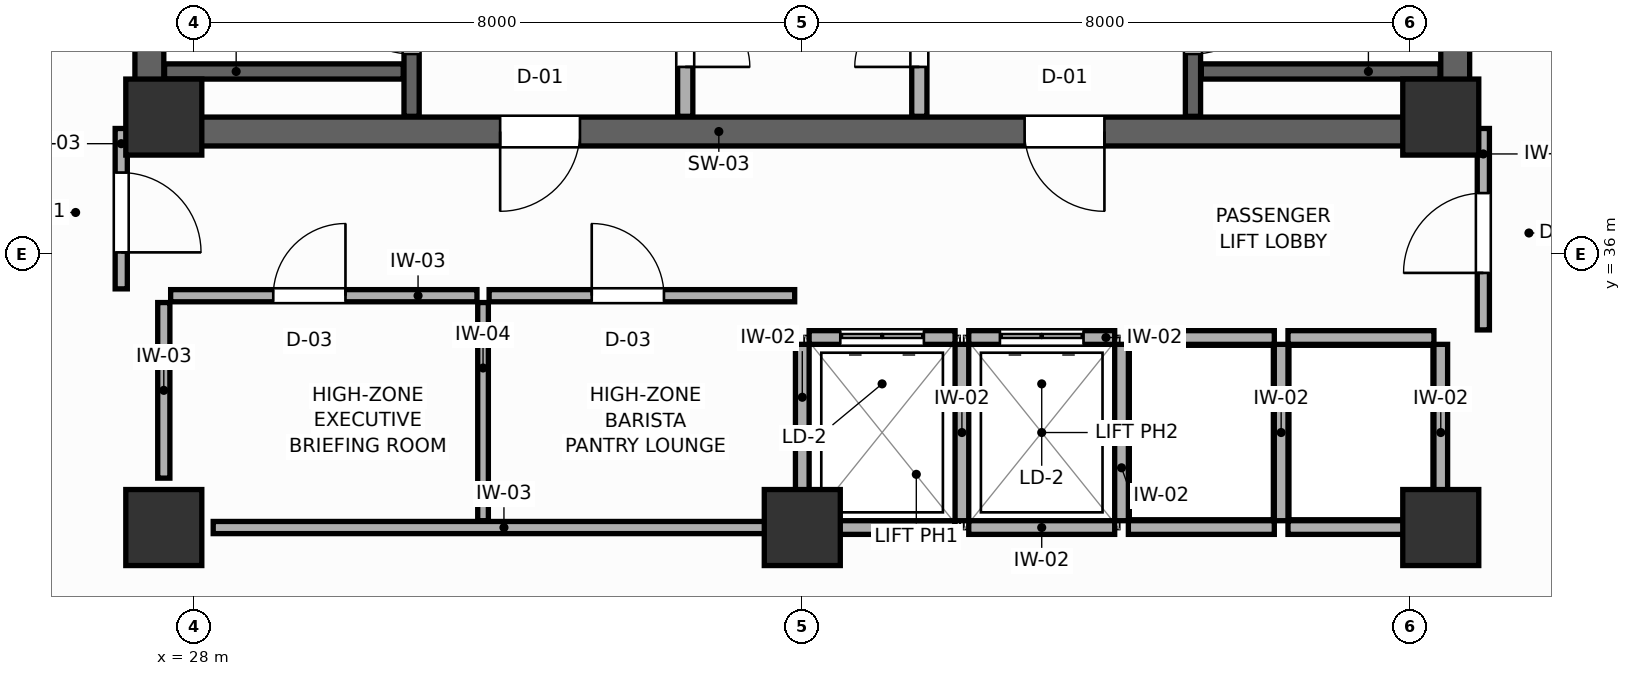
"""IFC4 building model, lengths in metres.
Left out: names, types, materials, properties, quantities, classifications, styles, units other than length and angle.
Written with IfcOpenShell. Run it as: python <this file> out.ifc"""

import sys

from ifc_helpers import new_model, si_unit, direction, frame, frame_2d, origin, origin_2d, place, context, subcontext, project, spatial, rectangle, extrude, source, transform, mapped, element, fill, save


model = new_model("IFC4")
c1 = context("Model", 3, precision=1e-05, world=origin(), true_north=direction((0.0, 1.0)))
c2 = subcontext(c1, "Body", "Model", "MODEL_VIEW")
j1 = project(units=[si_unit("LENGTHUNIT", "METRE"), si_unit("PLANEANGLEUNIT", "RADIAN")], contexts=[c1])
p1 = place(None, origin())
s1 = spatial("IfcSite", under=j1, at=p1, CompositionType="ELEMENT")
p2 = place(p1, origin())
s2 = spatial("IfcBuilding", under=s1, at=p2, CompositionType="ELEMENT")
p3 = place(p2, frame((0.0, 0.0, 234.6)))
s3 = spatial("IfcBuildingStorey", under=s2, at=p3, CompositionType="ELEMENT", Elevation=234.6)
p4 = place(p3, frame((27.22, 37.61, 0.0), z_axis=(0.0, 0.0, 1.0), x_axis=(1.0, 0.0, 0.0)))
e1 = element("IfcWall", 1, at=p4, inside=s3, PredefinedType="SHEAR", context=c2, shape_type="SweptSolid", body=[
    extrude(rectangle(XDim=17.56, YDim=0.38, at=frame_2d((8.78, 0.0))), origin(), (0.0, 0.0, 1.0), 3.6),
])
p5 = place(p4, frame((4.805, 0.0, 0.0)))
e2 = element("IfcOpeningElement", 2, at=p5, cuts=e1, PredefinedType="OPENING", context=c2, shape_type="SweptSolid", body=[
    extrude(rectangle(XDim=1.05, YDim=2.1, at=frame_2d((0.525, 1.05))), frame((0.0, 0.2, 0.0), z_axis=(0.0, -1.0, 0.0), x_axis=(1.0, 0.0, 0.0)), (0.0, 0.0, 1.0), 0.4),
])
p6 = place(p4, frame((11.705, 0.0, 0.0)))
e3 = element("IfcOpeningElement", 3, at=p6, cuts=e1, PredefinedType="OPENING", context=c2, shape_type="SweptSolid", body=[
    extrude(rectangle(XDim=1.05, YDim=2.1, at=frame_2d((0.525, 1.05))), frame((0.0, 0.2, 0.0), z_axis=(0.0, -1.0, 0.0), x_axis=(1.0, 0.0, 0.0)), (0.0, 0.0, 1.0), 0.4),
])
for number, where, z_axis, x_axis in (
    (4, (27.41, 37.8, 0.0), (0.0, 0.0, 1.0), (0.0, 1.0, 0.0)),
    (5, (44.59, 37.8, 0.0), (0.0, 0.0, 1.0), (0.0, 1.0, 0.0)),
):
    element("IfcWall", number, at=place(p3, frame(where, z_axis=z_axis, x_axis=x_axis)), inside=s3, PredefinedType="SHEAR", context=c2, shape_type="SweptSolid", body=[
        extrude(rectangle(XDim=9.0, YDim=0.38, at=frame_2d((4.5, 0.0))), origin(), (0.0, 0.0, 1.0), 3.6),
    ])
m1 = source(origin(), c2, "Body", "SweptSolid", [
    extrude(rectangle(XDim=1.0, YDim=1.0, at=origin_2d()), origin(), (0.0, 0.0, 1.0), 3.6),
])
for number, where, z_axis, x_axis in (
    (6, (27.6, 37.8, 0.0), (0.0, 0.0, 1.0), (1.0, 0.0, 0.0)),
    (7, (44.4, 37.8, 0.0), (0.0, 0.0, 1.0), (1.0, 0.0, 0.0)),
    (8, (27.6, 32.4, 0.0), (0.0, 0.0, 1.0), (1.0, 0.0, 0.0)),
    (9, (44.4, 32.4, 0.0), (0.0, 0.0, 1.0), (1.0, 0.0, 0.0)),
    (10, (36.0, 32.4, 0.0), (0.0, 0.0, 1.0), (1.0, 0.0, 0.0)),
):
    element("IfcColumn", number, at=place(p3, frame(where, z_axis=z_axis, x_axis=x_axis)), inside=s3, PredefinedType="COLUMN", context=c2, shape_type="MappedRepresentation", body=[
        mapped(m1, transform((0.0, 0.0, 0.0), scale=1.0)),
    ])
p7 = place(p3, frame((30.86, 37.81, 0.0), z_axis=(0.0, 0.0, 1.0), x_axis=(0.0, 1.0, 0.0)))
e11 = element("IfcWall", 11, at=p7, inside=s3, PredefinedType="SHEAR", context=c2, shape_type="SweptSolid", body=[
    extrude(rectangle(XDim=8.98, YDim=0.2, at=frame_2d((4.49, 0.0))), origin(), (0.0, 0.0, 1.0), 3.6),
])
p8 = place(p7, frame((0.82, 0.0, 0.0)))
e12 = element("IfcOpeningElement", 12, at=p8, cuts=e11, PredefinedType="OPENING", context=c2, shape_type="SweptSolid", body=[
    extrude(rectangle(XDim=1.05, YDim=2.1, at=frame_2d((0.525, 1.05))), frame((0.0, 0.11, 0.0), z_axis=(0.0, -1.0, 0.0), x_axis=(1.0, 0.0, 0.0)), (0.0, 0.0, 1.0), 0.22),
])
p9 = place(p3, frame((27.61, 38.4, 0.0), z_axis=(0.0, 0.0, 1.0), x_axis=(1.0, 0.0, 0.0)))
e13 = element("IfcWall", 13, at=p9, inside=s3, PredefinedType="SHEAR", context=c2, shape_type="SweptSolid", body=[
    extrude(rectangle(XDim=3.14, YDim=0.2, at=frame_2d((1.57, 0.0))), origin(), (0.0, 0.0, 1.0), 3.6),
])
p10 = place(p3, frame((41.14, 37.81, 0.0), z_axis=(0.0, 0.0, 1.0), x_axis=(0.0, 1.0, 0.0)))
e14 = element("IfcWall", 14, at=p10, inside=s3, PredefinedType="SHEAR", context=c2, shape_type="SweptSolid", body=[
    extrude(rectangle(XDim=8.98, YDim=0.2, at=frame_2d((4.49, 0.0))), origin(), (0.0, 0.0, 1.0), 3.6),
])
p11 = place(p10, frame((0.82, 0.0, 0.0)))
e15 = element("IfcOpeningElement", 15, at=p11, cuts=e14, PredefinedType="OPENING", context=c2, shape_type="SweptSolid", body=[
    extrude(rectangle(XDim=1.05, YDim=2.1, at=frame_2d((0.525, 1.05))), frame((0.0, 0.11, 0.0), z_axis=(0.0, -1.0, 0.0), x_axis=(1.0, 0.0, 0.0)), (0.0, 0.0, 1.0), 0.22),
])
p12 = place(p3, frame((41.25, 38.4, 0.0), z_axis=(0.0, 0.0, 1.0), x_axis=(1.0, 0.0, 0.0)))
e16 = element("IfcWall", 16, at=p12, inside=s3, PredefinedType="SHEAR", context=c2, shape_type="SweptSolid", body=[
    extrude(rectangle(XDim=3.14, YDim=0.2, at=frame_2d((1.57, 0.0))), origin(), (0.0, 0.0, 1.0), 3.6),
])
p13 = place(p3, frame((34.46, 37.81, 0.0), z_axis=(0.0, 0.0, 1.0), x_axis=(0.0, 1.0, 0.0)))
e17 = element("IfcWall", 17, at=p13, inside=s3, PredefinedType="PARTITIONING", context=c2, shape_type="SweptSolid", body=[
    extrude(rectangle(XDim=8.98, YDim=0.2, at=frame_2d((4.49, 0.0))), origin(), (0.0, 0.0, 1.0), 3.26),
])
p14 = place(p13, frame((0.65, 0.0, 0.0)))
e18 = element("IfcOpeningElement", 18, at=p14, cuts=e17, PredefinedType="OPENING", context=c2, shape_type="SweptSolid", body=[
    extrude(rectangle(XDim=0.85, YDim=2.05, at=frame_2d((0.425, 1.025))), frame((0.0, 0.11, 0.0), z_axis=(0.0, -1.0, 0.0), x_axis=(1.0, 0.0, 0.0)), (0.0, 0.0, 1.0), 0.22),
])
p15 = place(p3, frame((37.54, 37.81, 0.0), z_axis=(0.0, 0.0, 1.0), x_axis=(0.0, 1.0, 0.0)))
e19 = element("IfcWall", 19, at=p15, inside=s3, PredefinedType="PARTITIONING", context=c2, shape_type="SweptSolid", body=[
    extrude(rectangle(XDim=8.98, YDim=0.2, at=frame_2d((4.49, 0.0))), origin(), (0.0, 0.0, 1.0), 3.26),
])
p16 = place(p15, frame((0.65, 0.0, 0.0)))
e20 = element("IfcOpeningElement", 20, at=p16, cuts=e19, PredefinedType="OPENING", context=c2, shape_type="SweptSolid", body=[
    extrude(rectangle(XDim=0.85, YDim=2.05, at=frame_2d((0.425, 1.025))), frame((0.0, 0.11, 0.0), z_axis=(0.0, -1.0, 0.0), x_axis=(1.0, 0.0, 0.0)), (0.0, 0.0, 1.0), 0.22),
])
p17 = place(p3, frame((36.09, 34.9, 0.0), z_axis=(0.0, 0.0, 1.0), x_axis=(1.0, 0.0, 0.0)))
e21 = element("IfcWall", 21, at=p17, inside=s3, PredefinedType="PARTITIONING", context=c2, shape_type="SweptSolid", body=[
    extrude(rectangle(XDim=1.92, YDim=0.18, at=frame_2d((0.96, 0.0))), origin(), (0.0, 0.0, 1.0), 3.26),
])
p18 = place(p17, frame((0.41, 0.0, 0.0)))
e22 = element("IfcOpeningElement", 22, at=p18, cuts=e21, PredefinedType="OPENING", context=c2, shape_type="SweptSolid", body=[
    extrude(rectangle(XDim=1.1, YDim=2.1, at=frame_2d((0.55, 1.05))), frame((0.0, 0.1, 0.0), z_axis=(0.0, -1.0, 0.0), x_axis=(1.0, 0.0, 0.0)), (0.0, 0.0, 1.0), 0.2),
])
p19 = place(p3, frame((36.09, 32.4, 0.0), z_axis=(0.0, 0.0, 1.0), x_axis=(1.0, 0.0, 0.0)))
e23 = element("IfcWall", 23, at=p19, inside=s3, PredefinedType="PARTITIONING", context=c2, shape_type="SweptSolid", body=[
    extrude(rectangle(XDim=1.92, YDim=0.18, at=frame_2d((0.96, 0.0))), origin(), (0.0, 0.0, 1.0), 2.81),
])
p20 = place(p3, frame((36.0, 32.49, 0.0), z_axis=(0.0, 0.0, 1.0), x_axis=(0.0, 1.0, 0.0)))
e24 = element("IfcWall", 24, at=p20, inside=s3, PredefinedType="PARTITIONING", context=c2, shape_type="SweptSolid", body=[
    extrude(rectangle(XDim=2.32, YDim=0.18, at=frame_2d((1.16, 0.0))), origin(), (0.0, 0.0, 1.0), 3.26),
])
p21 = place(p3, frame((38.19, 34.9, 0.0), z_axis=(0.0, 0.0, 1.0), x_axis=(1.0, 0.0, 0.0)))
e25 = element("IfcWall", 25, at=p21, inside=s3, PredefinedType="PARTITIONING", context=c2, shape_type="SweptSolid", body=[
    extrude(rectangle(XDim=1.92, YDim=0.18, at=frame_2d((0.96, 0.0))), origin(), (0.0, 0.0, 1.0), 3.26),
])
p22 = place(p21, frame((0.41, 0.0, 0.0)))
e26 = element("IfcOpeningElement", 26, at=p22, cuts=e25, PredefinedType="OPENING", context=c2, shape_type="SweptSolid", body=[
    extrude(rectangle(XDim=1.1, YDim=2.1, at=frame_2d((0.55, 1.05))), frame((0.0, 0.1, 0.0), z_axis=(0.0, -1.0, 0.0), x_axis=(1.0, 0.0, 0.0)), (0.0, 0.0, 1.0), 0.2),
])
p23 = place(p3, frame((38.19, 32.4, 0.0), z_axis=(0.0, 0.0, 1.0), x_axis=(1.0, 0.0, 0.0)))
e27 = element("IfcWall", 27, at=p23, inside=s3, PredefinedType="PARTITIONING", context=c2, shape_type="SweptSolid", body=[
    extrude(rectangle(XDim=1.92, YDim=0.18, at=frame_2d((0.96, 0.0))), origin(), (0.0, 0.0, 1.0), 2.81),
])
p24 = place(p3, frame((38.1, 32.49, 0.0), z_axis=(0.0, 0.0, 1.0), x_axis=(0.0, 1.0, 0.0)))
e28 = element("IfcWall", 28, at=p24, inside=s3, PredefinedType="PARTITIONING", context=c2, shape_type="SweptSolid", body=[
    extrude(rectangle(XDim=2.32, YDim=0.18, at=frame_2d((1.16, 0.0))), origin(), (0.0, 0.0, 1.0), 3.26),
])
p25 = place(p3, frame((40.29, 34.9, 0.0), z_axis=(0.0, 0.0, 1.0), x_axis=(1.0, 0.0, 0.0)))
e29 = element("IfcWall", 29, at=p25, inside=s3, PredefinedType="PARTITIONING", context=c2, shape_type="SweptSolid", body=[
    extrude(rectangle(XDim=1.92, YDim=0.18, at=frame_2d((0.96, 0.0))), origin(), (0.0, 0.0, 1.0), 3.26),
])
p26 = place(p3, frame((40.29, 32.4, 0.0), z_axis=(0.0, 0.0, 1.0), x_axis=(1.0, 0.0, 0.0)))
e30 = element("IfcWall", 30, at=p26, inside=s3, PredefinedType="PARTITIONING", context=c2, shape_type="SweptSolid", body=[
    extrude(rectangle(XDim=1.92, YDim=0.18, at=frame_2d((0.96, 0.0))), origin(), (0.0, 0.0, 1.0), 2.81),
])
p27 = place(p3, frame((40.2, 32.49, 0.0), z_axis=(0.0, 0.0, 1.0), x_axis=(0.0, 1.0, 0.0)))
e31 = element("IfcWall", 31, at=p27, inside=s3, PredefinedType="PARTITIONING", context=c2, shape_type="SweptSolid", body=[
    extrude(rectangle(XDim=2.32, YDim=0.18, at=frame_2d((1.16, 0.0))), origin(), (0.0, 0.0, 1.0), 3.26),
])
p28 = place(p3, frame((42.39, 34.9, 0.0), z_axis=(0.0, 0.0, 1.0), x_axis=(1.0, 0.0, 0.0)))
e32 = element("IfcWall", 32, at=p28, inside=s3, PredefinedType="PARTITIONING", context=c2, shape_type="SweptSolid", body=[
    extrude(rectangle(XDim=1.92, YDim=0.18, at=frame_2d((0.96, 0.0))), origin(), (0.0, 0.0, 1.0), 3.26),
])
p29 = place(p3, frame((42.39, 32.4, 0.0), z_axis=(0.0, 0.0, 1.0), x_axis=(1.0, 0.0, 0.0)))
e33 = element("IfcWall", 33, at=p29, inside=s3, PredefinedType="PARTITIONING", context=c2, shape_type="SweptSolid", body=[
    extrude(rectangle(XDim=1.92, YDim=0.18, at=frame_2d((0.96, 0.0))), origin(), (0.0, 0.0, 1.0), 2.81),
])
for number, where, z_axis, x_axis in (
    (34, (42.3, 32.49, 0.0), (0.0, 0.0, 1.0), (0.0, 1.0, 0.0)),
    (35, (44.4, 32.49, 0.0), (0.0, 0.0, 1.0), (0.0, 1.0, 0.0)),
):
    element("IfcWall", number, at=place(p3, frame(where, z_axis=z_axis, x_axis=x_axis)), inside=s3, PredefinedType="PARTITIONING", context=c2, shape_type="SweptSolid", body=[
        extrude(rectangle(XDim=2.32, YDim=0.18, at=frame_2d((1.16, 0.0))), origin(), (0.0, 0.0, 1.0), 3.26),
    ])
p30 = place(p3, frame((28.25, 32.4, 0.0), z_axis=(0.0, 0.0, 1.0), x_axis=(1.0, 0.0, 0.0)))
e36 = element("IfcWall", 36, at=p30, inside=s3, PredefinedType="PARTITIONING", context=c2, shape_type="SweptSolid", body=[
    extrude(rectangle(XDim=7.65, YDim=0.16, at=frame_2d((3.825, 0.0))), origin(), (0.0, 0.0, 1.0), 2.81),
])
p31 = place(p3, frame((27.6, 33.05, 0.0), z_axis=(0.0, 0.0, 1.0), x_axis=(0.0, 1.0, 0.0)))
e37 = element("IfcWall", 37, at=p31, inside=s3, PredefinedType="PARTITIONING", context=c2, shape_type="SweptSolid", body=[
    extrude(rectangle(XDim=2.31, YDim=0.16, at=frame_2d((1.155, 0.0))), origin(), (0.0, 0.0, 1.0), 3.26),
])
p32 = place(p3, frame((31.8, 32.49, 0.0), z_axis=(0.0, 0.0, 1.0), x_axis=(0.0, 1.0, 0.0)))
e38 = element("IfcWall", 38, at=p32, inside=s3, PredefinedType="PARTITIONING", context=c2, shape_type="SweptSolid", body=[
    extrude(rectangle(XDim=2.87, YDim=0.14, at=frame_2d((1.435, 0.0))), origin(), (0.0, 0.0, 1.0), 3.26),
])
p33 = place(p3, frame((27.69, 35.45, 0.0), z_axis=(0.0, 0.0, 1.0), x_axis=(1.0, 0.0, 0.0)))
e39 = element("IfcWall", 39, at=p33, inside=s3, PredefinedType="PARTITIONING", context=c2, shape_type="SweptSolid", body=[
    extrude(rectangle(XDim=4.03, YDim=0.16, at=frame_2d((2.015, 0.0))), origin(), (0.0, 0.0, 1.0), 3.26),
])
p34 = place(p33, frame((1.35, 0.0, 0.0)))
e40 = element("IfcOpeningElement", 40, at=p34, cuts=e39, PredefinedType="OPENING", context=c2, shape_type="SweptSolid", body=[
    extrude(rectangle(XDim=0.95, YDim=2.05, at=frame_2d((0.475, 1.025))), frame((0.0, 0.09, 0.0), z_axis=(0.0, -1.0, 0.0), x_axis=(1.0, 0.0, 0.0)), (0.0, 0.0, 1.0), 0.18),
])
p35 = place(p3, frame((31.88, 35.45, 0.0), z_axis=(0.0, 0.0, 1.0), x_axis=(1.0, 0.0, 0.0)))
e41 = element("IfcWall", 41, at=p35, inside=s3, PredefinedType="PARTITIONING", context=c2, shape_type="SweptSolid", body=[
    extrude(rectangle(XDim=4.02, YDim=0.16, at=frame_2d((2.01, 0.0))), origin(), (0.0, 0.0, 1.0), 3.26),
])
p36 = place(p35, frame((1.35, 0.0, 0.0)))
e42 = element("IfcOpeningElement", 42, at=p36, cuts=e41, PredefinedType="OPENING", context=c2, shape_type="SweptSolid", body=[
    extrude(rectangle(XDim=0.95, YDim=2.05, at=frame_2d((0.475, 1.025))), frame((0.0, 0.09, 0.0), z_axis=(0.0, -1.0, 0.0), x_axis=(1.0, 0.0, 0.0)), (0.0, 0.0, 1.0), 0.18),
])
p37 = place(p3, frame((27.04, 35.54, 0.0), z_axis=(0.0, 0.0, 1.0), x_axis=(0.0, 1.0, 0.0)))
e43 = element("IfcWall", 43, at=p37, inside=s3, PredefinedType="PARTITIONING", context=c2, shape_type="SweptSolid", body=[
    extrude(rectangle(XDim=2.11, YDim=0.16, at=frame_2d((1.055, 0.0))), origin(), (0.0, 0.0, 1.0), 3.26),
])
p38 = place(p37, frame((0.48, 0.0, 0.0)))
e44 = element("IfcOpeningElement", 44, at=p38, cuts=e43, PredefinedType="OPENING", context=c2, shape_type="SweptSolid", body=[
    extrude(rectangle(XDim=1.05, YDim=2.1, at=frame_2d((0.525, 1.05))), frame((0.0, 0.09, 0.0), z_axis=(0.0, -1.0, 0.0), x_axis=(1.0, 0.0, 0.0)), (0.0, 0.0, 1.0), 0.18),
])
p39 = place(p3, frame((44.96, 35.0, 0.0), z_axis=(0.0, 0.0, 1.0), x_axis=(0.0, 1.0, 0.0)))
e45 = element("IfcWall", 45, at=p39, inside=s3, PredefinedType="PARTITIONING", context=c2, shape_type="SweptSolid", body=[
    extrude(rectangle(XDim=2.65, YDim=0.16, at=frame_2d((1.325, 0.0))), origin(), (0.0, 0.0, 1.0), 3.26),
])
p40 = place(p39, frame((0.75, 0.0, 0.0)))
e46 = element("IfcOpeningElement", 46, at=p40, cuts=e45, PredefinedType="OPENING", context=c2, shape_type="SweptSolid", body=[
    extrude(rectangle(XDim=1.05, YDim=2.1, at=frame_2d((0.525, 1.05))), frame((0.0, 0.09, 0.0), z_axis=(0.0, -1.0, 0.0), x_axis=(1.0, 0.0, 0.0)), (0.0, 0.0, 1.0), 0.18),
])
p41 = place(p8, origin())
e47 = element("IfcDoor", 47, at=p41, inside=s3, OperationType="SINGLE_SWING_RIGHT", PredefinedType="DOOR", context=c2, shape_type="SweptSolid", body=[
    extrude(rectangle(XDim=1.05, YDim=2.1, at=frame_2d((0.525, 1.05))), frame((0.0, 0.025, 0.0), z_axis=(0.0, -1.0, 0.0), x_axis=(1.0, 0.0, 0.0)), (0.0, 0.0, 1.0), 0.05),
])
fill(e12, e47)
p42 = place(p11, frame((1.05, 0.0, 0.0), z_axis=(0.0, 0.0, 1.0), x_axis=(-1.0, 0.0, 0.0)))
e48 = element("IfcDoor", 48, at=p42, inside=s3, OperationType="SINGLE_SWING_LEFT", PredefinedType="DOOR", context=c2, shape_type="SweptSolid", body=[
    extrude(rectangle(XDim=1.05, YDim=2.1, at=frame_2d((0.525, 1.05))), frame((0.0, 0.025, 0.0), z_axis=(0.0, -1.0, 0.0), x_axis=(1.0, 0.0, 0.0)), (0.0, 0.0, 1.0), 0.05),
])
fill(e15, e48)
p43 = place(p14, frame((0.85, 0.0, 0.0), z_axis=(0.0, 0.0, 1.0), x_axis=(-1.0, 0.0, 0.0)))
e49 = element("IfcDoor", 49, at=p43, inside=s3, OperationType="SINGLE_SWING_RIGHT", PredefinedType="DOOR", context=c2, shape_type="SweptSolid", body=[
    extrude(rectangle(XDim=0.85, YDim=2.05, at=frame_2d((0.425, 1.025))), frame((0.0, 0.025, 0.0), z_axis=(0.0, -1.0, 0.0), x_axis=(1.0, 0.0, 0.0)), (0.0, 0.0, 1.0), 0.05),
])
fill(e18, e49)
p44 = place(p16, origin())
e50 = element("IfcDoor", 50, at=p44, inside=s3, OperationType="SINGLE_SWING_LEFT", PredefinedType="DOOR", context=c2, shape_type="SweptSolid", body=[
    extrude(rectangle(XDim=0.85, YDim=2.05, at=frame_2d((0.425, 1.025))), frame((0.0, 0.025, 0.0), z_axis=(0.0, -1.0, 0.0), x_axis=(1.0, 0.0, 0.0)), (0.0, 0.0, 1.0), 0.05),
])
fill(e20, e50)
p45 = place(p18, origin())
e51 = element("IfcDoor", 51, at=p45, inside=s3, OperationType="DOUBLE_DOOR_SLIDING", PredefinedType="DOOR", context=c2, shape_type="SweptSolid", body=[
    extrude(rectangle(XDim=1.1, YDim=2.1, at=frame_2d((0.55, 1.05))), frame((0.0, 0.025, 0.0), z_axis=(0.0, -1.0, 0.0), x_axis=(1.0, 0.0, 0.0)), (0.0, 0.0, 1.0), 0.05),
])
fill(e22, e51)
p46 = place(p22, origin())
e52 = element("IfcDoor", 52, at=p46, inside=s3, OperationType="DOUBLE_DOOR_SLIDING", PredefinedType="DOOR", context=c2, shape_type="SweptSolid", body=[
    extrude(rectangle(XDim=1.1, YDim=2.1, at=frame_2d((0.55, 1.05))), frame((0.0, 0.025, 0.0), z_axis=(0.0, -1.0, 0.0), x_axis=(1.0, 0.0, 0.0)), (0.0, 0.0, 1.0), 0.05),
])
fill(e26, e52)
p47 = place(p34, origin())
e53 = element("IfcDoor", 53, at=p47, inside=s3, OperationType="SINGLE_SWING_RIGHT", PredefinedType="DOOR", context=c2, shape_type="SweptSolid", body=[
    extrude(rectangle(XDim=0.95, YDim=2.05, at=frame_2d((0.475, 1.025))), frame((0.0, 0.025, 0.0), z_axis=(0.0, -1.0, 0.0), x_axis=(1.0, 0.0, 0.0)), (0.0, 0.0, 1.0), 0.05),
])
fill(e40, e53)
p48 = place(p36, origin())
e54 = element("IfcDoor", 54, at=p48, inside=s3, OperationType="SINGLE_SWING_LEFT", PredefinedType="DOOR", context=c2, shape_type="SweptSolid", body=[
    extrude(rectangle(XDim=0.95, YDim=2.05, at=frame_2d((0.475, 1.025))), frame((0.0, 0.025, 0.0), z_axis=(0.0, -1.0, 0.0), x_axis=(1.0, 0.0, 0.0)), (0.0, 0.0, 1.0), 0.05),
])
fill(e42, e54)
p49 = place(p38, frame((1.05, 0.0, 0.0), z_axis=(0.0, 0.0, 1.0), x_axis=(-1.0, 0.0, 0.0)))
e55 = element("IfcDoor", 55, at=p49, inside=s3, OperationType="SINGLE_SWING_RIGHT", PredefinedType="DOOR", context=c2, shape_type="SweptSolid", body=[
    extrude(rectangle(XDim=1.05, YDim=2.1, at=frame_2d((0.525, 1.05))), frame((0.0, 0.025, 0.0), z_axis=(0.0, -1.0, 0.0), x_axis=(1.0, 0.0, 0.0)), (0.0, 0.0, 1.0), 0.05),
])
fill(e44, e55)
p50 = place(p40, origin())
e56 = element("IfcDoor", 56, at=p50, inside=s3, OperationType="SINGLE_SWING_LEFT", PredefinedType="DOOR", context=c2, shape_type="SweptSolid", body=[
    extrude(rectangle(XDim=1.05, YDim=2.1, at=frame_2d((0.525, 1.05))), frame((0.0, 0.025, 0.0), z_axis=(0.0, -1.0, 0.0), x_axis=(1.0, 0.0, 0.0)), (0.0, 0.0, 1.0), 0.05),
])
fill(e46, e56)
p51 = place(p5, frame((1.05, 0.0, 0.0), z_axis=(0.0, 0.0, 1.0), x_axis=(-1.0, 0.0, 0.0)))
e57 = element("IfcDoor", 57, at=p51, inside=s3, OperationType="SINGLE_SWING_RIGHT", PredefinedType="DOOR", context=c2, shape_type="SweptSolid", body=[
    extrude(rectangle(XDim=1.05, YDim=2.1, at=frame_2d((0.525, 1.05))), frame((0.0, 0.025, 0.0), z_axis=(0.0, -1.0, 0.0), x_axis=(1.0, 0.0, 0.0)), (0.0, 0.0, 1.0), 0.05),
])
fill(e2, e57)
p52 = place(p6, frame((1.05, 0.0, 0.0), z_axis=(0.0, 0.0, 1.0), x_axis=(-1.0, 0.0, 0.0)))
e58 = element("IfcDoor", 58, at=p52, inside=s3, OperationType="SINGLE_SWING_LEFT", PredefinedType="DOOR", context=c2, shape_type="SweptSolid", body=[
    extrude(rectangle(XDim=1.05, YDim=2.1, at=frame_2d((0.525, 1.05))), frame((0.0, 0.025, 0.0), z_axis=(0.0, -1.0, 0.0), x_axis=(1.0, 0.0, 0.0)), (0.0, 0.0, 1.0), 0.05),
])
fill(e3, e58)
save(model, sys.argv[1])
